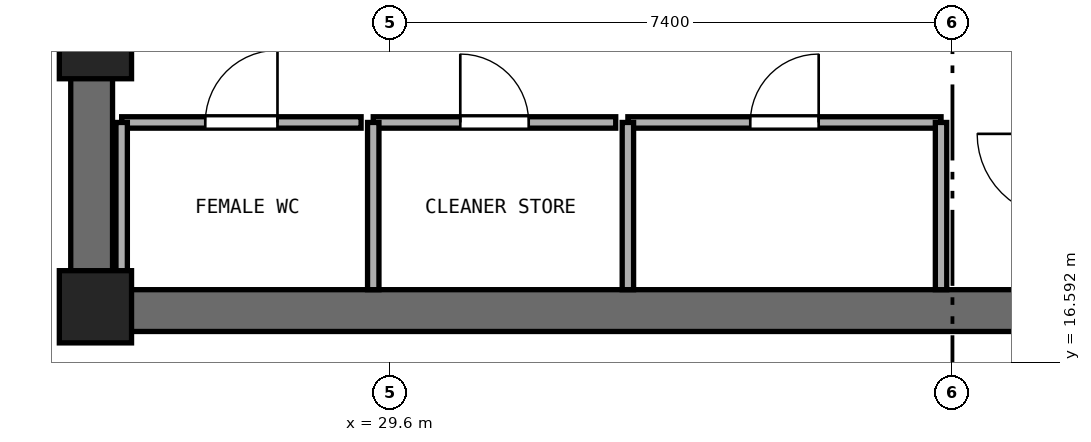
"""IFC4 building model, lengths in metres.
Left out: names, types, materials, properties, quantities, classifications, styles, units other than length and angle.
Written with IfcOpenShell. Run it as: python <this file> out.ifc"""

import sys

from ifc_helpers import new_model, si_unit, direction, frame, frame_2d, origin, origin_2d, place, context, subcontext, project, spatial, rectangle, extrude, element, fill, save


model = new_model("IFC4")
c1 = context("Model", 3, precision=1e-05, world=origin(), true_north=direction((0.0, 1.0)))
c2 = subcontext(c1, "Body", "Model", "MODEL_VIEW")
j1 = project(units=[si_unit("LENGTHUNIT", "METRE"), si_unit("PLANEANGLEUNIT", "RADIAN")], contexts=[c1])
p1 = place(None, origin())
s1 = spatial("IfcSite", under=j1, at=p1, CompositionType="ELEMENT")
p2 = place(p1, origin())
s2 = spatial("IfcBuilding", under=s1, at=p2, CompositionType="ELEMENT")
p3 = place(p2, frame((0.0, 0.0, 159.2)))
s3 = spatial("IfcBuildingStorey", under=s2, at=p3, CompositionType="ELEMENT", Elevation=159.2)
p4 = place(p3, frame((25.4, 17.275, 0.0), z_axis=(0.0, 0.0, 1.0), x_axis=(1.0, 0.0, 0.0)))
e1 = element("IfcWall", 1, at=p4, inside=s3, PredefinedType="SHEAR", context=c2, shape_type="SweptSolid", body=[
    extrude(rectangle(XDim=23.2, YDim=0.55, at=frame_2d((11.6, 0.0))), origin(), (0.0, 0.0, 1.0), 3.54),
])
p5 = place(p3, frame((25.675, 17.55, 0.0), z_axis=(0.0, 0.0, 1.0), x_axis=(0.0, 1.0, 0.0)))
e2 = element("IfcWall", 2, at=p5, inside=s3, PredefinedType="SHEAR", context=c2, shape_type="SweptSolid", body=[
    extrude(rectangle(XDim=15.3, YDim=0.55, at=frame_2d((7.65, 0.0))), origin(), (0.0, 0.0, 1.0), 3.54),
])
p6 = place(p5, frame((6.9, 0.0, 0.0)))
e3 = element("IfcOpeningElement", 3, at=p6, cuts=e2, PredefinedType="OPENING", context=c2, shape_type="SweptSolid", body=[
    extrude(rectangle(XDim=1.5, YDim=2.15, at=frame_2d((0.75, 1.075))), frame((0.0, 0.285, 0.0), z_axis=(0.0, -1.0, 0.0), x_axis=(1.0, 0.0, 0.0)), (0.0, 0.0, 1.0), 0.57),
])
for number, where, z_axis, x_axis in (
    (4, (25.725, 17.325, 0.0), (0.0, 0.0, 1.0), (1.0, 0.0, 0.0)),
    (5, (25.725, 20.8, 0.0), (0.0, 0.0, 1.0), (1.0, 0.0, 0.0)),
):
    element("IfcColumn", number, at=place(p3, frame(where, z_axis=z_axis, x_axis=x_axis)), inside=s3, PredefinedType="PILASTER", context=c2, shape_type="SweptSolid", body=[
        extrude(rectangle(XDim=0.95, YDim=0.95, at=origin_2d()), origin(), (0.0, 0.0, 1.0), 3.8),
    ])
p7 = place(p3, frame((26.07, 19.75, 0.0), z_axis=(0.0, 0.0, 1.0), x_axis=(1.0, 0.0, 0.0)))
e6 = element("IfcWall", 6, at=p7, inside=s3, PredefinedType="PARTITIONING", context=c2, shape_type="SweptSolid", body=[
    extrude(rectangle(XDim=3.15, YDim=0.15, at=frame_2d((1.575, 0.0))), origin(), (0.0, 0.0, 1.0), 3.54),
])
p8 = place(p7, frame((1.1, 0.0, 0.0)))
e7 = element("IfcOpeningElement", 7, at=p8, cuts=e6, PredefinedType="OPENING", context=c2, shape_type="SweptSolid", body=[
    extrude(rectangle(XDim=0.95, YDim=2.1, at=frame_2d((0.475, 1.05))), frame((0.0, 0.085, 0.0), z_axis=(0.0, -1.0, 0.0), x_axis=(1.0, 0.0, 0.0)), (0.0, 0.0, 1.0), 0.17),
])
p9 = place(p3, frame((26.07, 17.55, 0.0), z_axis=(0.0, 0.0, 1.0), x_axis=(0.0, 1.0, 0.0)))
e8 = element("IfcWall", 8, at=p9, inside=s3, PredefinedType="PARTITIONING", context=c2, shape_type="SweptSolid", body=[
    extrude(rectangle(XDim=2.2, YDim=0.15, at=frame_2d((1.1, 0.0))), origin(), (0.0, 0.0, 1.0), 2.64),
])
p10 = place(p3, frame((29.38, 19.75, 0.0), z_axis=(0.0, 0.0, 1.0), x_axis=(1.0, 0.0, 0.0)))
e9 = element("IfcWall", 9, at=p10, inside=s3, PredefinedType="PARTITIONING", context=c2, shape_type="SweptSolid", body=[
    extrude(rectangle(XDim=3.19, YDim=0.15, at=frame_2d((1.595, 0.0))), origin(), (0.0, 0.0, 1.0), 3.54),
])
p11 = place(p10, frame((1.145, 0.0, 0.0)))
e10 = element("IfcOpeningElement", 10, at=p11, cuts=e9, PredefinedType="OPENING", context=c2, shape_type="SweptSolid", body=[
    extrude(rectangle(XDim=0.9, YDim=2.1, at=frame_2d((0.45, 1.05))), frame((0.0, 0.085, 0.0), z_axis=(0.0, -1.0, 0.0), x_axis=(1.0, 0.0, 0.0)), (0.0, 0.0, 1.0), 0.17),
])
p12 = place(p3, frame((29.38, 17.55, 0.0), z_axis=(0.0, 0.0, 1.0), x_axis=(0.0, 1.0, 0.0)))
e11 = element("IfcWall", 11, at=p12, inside=s3, PredefinedType="PARTITIONING", context=c2, shape_type="SweptSolid", body=[
    extrude(rectangle(XDim=2.2, YDim=0.15, at=frame_2d((1.1, 0.0))), origin(), (0.0, 0.0, 1.0), 3.54),
])
p13 = place(p3, frame((32.73, 19.75, 0.0), z_axis=(0.0, 0.0, 1.0), x_axis=(1.0, 0.0, 0.0)))
e12 = element("IfcWall", 12, at=p13, inside=s3, PredefinedType="PARTITIONING", context=c2, shape_type="SweptSolid", body=[
    extrude(rectangle(XDim=4.12, YDim=0.15, at=frame_2d((2.06, 0.0))), origin(), (0.0, 0.0, 1.0), 3.54),
])
p14 = place(p13, frame((1.61, 0.0, 0.0)))
e13 = element("IfcOpeningElement", 13, at=p14, cuts=e12, PredefinedType="OPENING", context=c2, shape_type="SweptSolid", body=[
    extrude(rectangle(XDim=0.9, YDim=2.1, at=frame_2d((0.45, 1.05))), frame((0.0, 0.085, 0.0), z_axis=(0.0, -1.0, 0.0), x_axis=(1.0, 0.0, 0.0)), (0.0, 0.0, 1.0), 0.17),
])
for number, where, z_axis, x_axis in (
    (14, (32.73, 17.55, 0.0), (0.0, 0.0, 1.0), (0.0, 1.0, 0.0)),
    (15, (36.85, 17.55, 0.0), (0.0, 0.0, 1.0), (0.0, 1.0, 0.0)),
):
    element("IfcWall", number, at=place(p3, frame(where, z_axis=z_axis, x_axis=x_axis)), inside=s3, PredefinedType="PARTITIONING", context=c2, shape_type="SweptSolid", body=[
        extrude(rectangle(XDim=2.2, YDim=0.15, at=frame_2d((1.1, 0.0))), origin(), (0.0, 0.0, 1.0), 3.54),
    ])
p15 = place(p8, origin())
e16 = element("IfcDoor", 16, at=p15, inside=s3, OperationType="SINGLE_SWING_RIGHT", PredefinedType="DOOR", context=c2, shape_type="SweptSolid", body=[
    extrude(rectangle(XDim=0.95, YDim=2.1, at=frame_2d((0.475, 1.05))), frame((0.0, 0.025, 0.0), z_axis=(0.0, -1.0, 0.0), x_axis=(1.0, 0.0, 0.0)), (0.0, 0.0, 1.0), 0.05),
])
fill(e7, e16)
p16 = place(p11, origin())
e17 = element("IfcDoor", 17, at=p16, inside=s3, OperationType="SINGLE_SWING_LEFT", PredefinedType="DOOR", context=c2, shape_type="SweptSolid", body=[
    extrude(rectangle(XDim=0.9, YDim=2.1, at=frame_2d((0.45, 1.05))), frame((0.0, 0.025, 0.0), z_axis=(0.0, -1.0, 0.0), x_axis=(1.0, 0.0, 0.0)), (0.0, 0.0, 1.0), 0.05),
])
fill(e10, e17)
p17 = place(p14, origin())
e18 = element("IfcDoor", 18, at=p17, inside=s3, OperationType="SINGLE_SWING_RIGHT", PredefinedType="DOOR", context=c2, shape_type="SweptSolid", body=[
    extrude(rectangle(XDim=0.9, YDim=2.1, at=frame_2d((0.45, 1.05))), frame((0.0, 0.025, 0.0), z_axis=(0.0, -1.0, 0.0), x_axis=(1.0, 0.0, 0.0)), (0.0, 0.0, 1.0), 0.05),
])
fill(e13, e18)
save(model, sys.argv[1])
